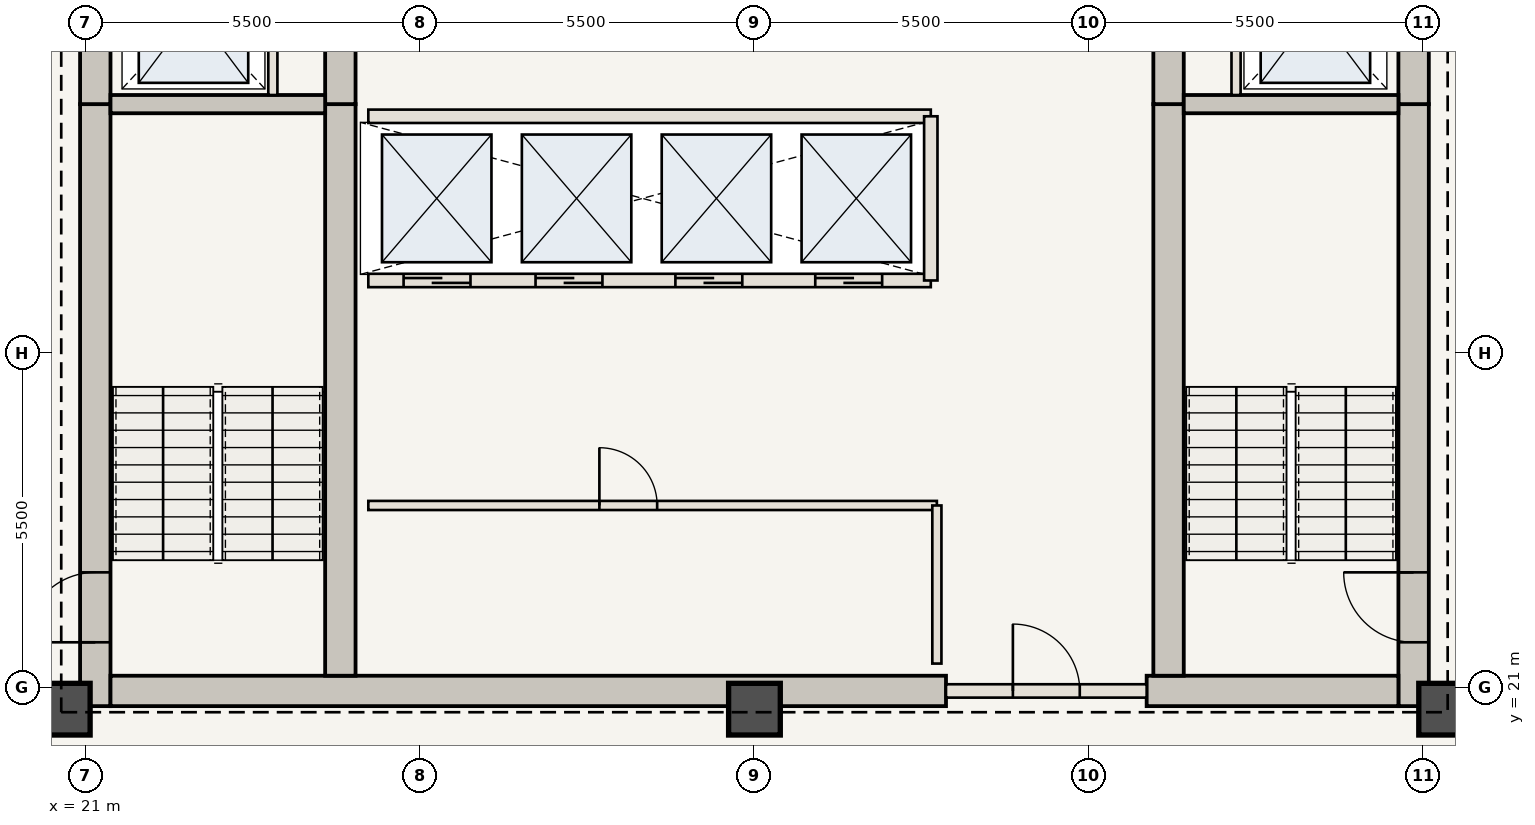
"""IFC4 building model, lengths in metres.
Left out: names, types, materials, properties, quantities, classifications, styles, units other than length and angle.
Written with IfcOpenShell. Run it as: python <this file> out.ifc"""

import sys

from ifc_helpers import new_model, si_unit, direction, frame, frame_2d, origin, origin_2d, place, context, subcontext, project, spatial, rectangle, extrude, element, fill, save


model = new_model("IFC4")
c1 = context("Model", 3, precision=1e-05, world=origin(), true_north=direction((0.0, 1.0)))
c2 = subcontext(c1, "Body", "Model", "MODEL_VIEW")
j1 = project(units=[si_unit("LENGTHUNIT", "METRE"), si_unit("PLANEANGLEUNIT", "RADIAN")], contexts=[c1])
p1 = place(None, origin())
s1 = spatial("IfcSite", under=j1, at=p1, CompositionType="ELEMENT")
p2 = place(p1, origin())
s2 = spatial("IfcBuilding", under=s1, at=p2, CompositionType="ELEMENT")
p3 = place(p2, frame((0.0, 0.0, 206.15)))
s3 = spatial("IfcBuildingStorey", under=s2, at=p3, CompositionType="ELEMENT", Elevation=206.15)
p4 = place(p3, frame((21.16, 20.7, 0.0), z_axis=(0.0, 0.0, 1.0), x_axis=(0.0, 1.0, 0.0)))
e1 = element("IfcWall", 1, at=p4, inside=s3, PredefinedType="SHEAR", context=c2, shape_type="SweptSolid", body=[
    extrude(rectangle(XDim=9.9, YDim=0.5, at=frame_2d((4.95, 0.0))), origin(), (0.0, 0.0, 1.0), 3.85),
])
p5 = place(p4, frame((1.05, 0.0, 0.0)))
e2 = element("IfcOpeningElement", 2, at=p5, cuts=e1, PredefinedType="OPENING", context=c2, shape_type="SweptSolid", body=[
    extrude(rectangle(XDim=1.15, YDim=2.15, at=frame_2d((0.575, 1.075))), frame((0.0, 0.26, 0.0), z_axis=(0.0, -1.0, 0.0), x_axis=(1.0, 0.0, 0.0)), (0.0, 0.0, 1.0), 0.52),
])
p6 = place(p3, frame((21.16, 30.6, 0.0), z_axis=(0.0, 0.0, 1.0), x_axis=(0.0, 1.0, 0.0)))
e3 = element("IfcWall", 3, at=p6, inside=s3, PredefinedType="SHEAR", context=c2, shape_type="SweptSolid", body=[
    extrude(rectangle(XDim=12.65, YDim=0.5, at=frame_2d((6.325, 0.0))), origin(), (0.0, 0.0, 1.0), 3.85),
])
p7 = place(p6, frame((4.2, 0.0, 0.0)))
e4 = element("IfcOpeningElement", 4, at=p7, cuts=e3, PredefinedType="OPENING", context=c2, shape_type="SweptSolid", body=[
    extrude(rectangle(XDim=1.1, YDim=2.15, at=frame_2d((0.55, 1.075))), frame((0.0, 0.26, 0.0), z_axis=(0.0, -1.0, 0.0), x_axis=(1.0, 0.0, 0.0)), (0.0, 0.0, 1.0), 0.52),
])
p8 = place(p6, frame((9.2, 0.0, 0.0)))
e5 = element("IfcOpeningElement", 5, at=p8, cuts=e3, PredefinedType="OPENING", context=c2, shape_type="SweptSolid", body=[
    extrude(rectangle(XDim=0.92, YDim=2.1, at=frame_2d((0.46, 1.05))), frame((0.0, 0.26, 0.0), z_axis=(0.0, -1.0, 0.0), x_axis=(1.0, 0.0, 0.0)), (0.0, 0.0, 1.0), 0.52),
])
p9 = place(p3, frame((42.84, 20.7, 0.0), z_axis=(0.0, 0.0, 1.0), x_axis=(0.0, 1.0, 0.0)))
e6 = element("IfcWall", 6, at=p9, inside=s3, PredefinedType="SHEAR", context=c2, shape_type="SweptSolid", body=[
    extrude(rectangle(XDim=9.9, YDim=0.5, at=frame_2d((4.95, 0.0))), origin(), (0.0, 0.0, 1.0), 3.85),
])
p10 = place(p9, frame((1.05, 0.0, 0.0)))
e7 = element("IfcOpeningElement", 7, at=p10, cuts=e6, PredefinedType="OPENING", context=c2, shape_type="SweptSolid", body=[
    extrude(rectangle(XDim=1.15, YDim=2.15, at=frame_2d((0.575, 1.075))), frame((0.0, 0.26, 0.0), z_axis=(0.0, -1.0, 0.0), x_axis=(1.0, 0.0, 0.0)), (0.0, 0.0, 1.0), 0.52),
])
p11 = place(p3, frame((42.84, 30.6, 0.0), z_axis=(0.0, 0.0, 1.0), x_axis=(0.0, 1.0, 0.0)))
e8 = element("IfcWall", 8, at=p11, inside=s3, PredefinedType="SHEAR", context=c2, shape_type="SweptSolid", body=[
    extrude(rectangle(XDim=12.65, YDim=0.5, at=frame_2d((6.325, 0.0))), origin(), (0.0, 0.0, 1.0), 3.85),
])
p12 = place(p11, frame((4.2, 0.0, 0.0)))
e9 = element("IfcOpeningElement", 9, at=p12, cuts=e8, PredefinedType="OPENING", context=c2, shape_type="SweptSolid", body=[
    extrude(rectangle(XDim=1.1, YDim=2.15, at=frame_2d((0.55, 1.075))), frame((0.0, 0.26, 0.0), z_axis=(0.0, -1.0, 0.0), x_axis=(1.0, 0.0, 0.0)), (0.0, 0.0, 1.0), 0.52),
])
p13 = place(p11, frame((8.05, 0.0, 0.0)))
e10 = element("IfcOpeningElement", 10, at=p13, cuts=e8, PredefinedType="OPENING", context=c2, shape_type="SweptSolid", body=[
    extrude(rectangle(XDim=0.88, YDim=2.1, at=frame_2d((0.44, 1.05))), frame((0.0, 0.26, 0.0), z_axis=(0.0, -1.0, 0.0), x_axis=(1.0, 0.0, 0.0)), (0.0, 0.0, 1.0), 0.52),
])
p14 = place(p11, frame((9.45, 0.0, 0.0)))
e11 = element("IfcOpeningElement", 11, at=p14, cuts=e8, PredefinedType="OPENING", context=c2, shape_type="SweptSolid", body=[
    extrude(rectangle(XDim=0.88, YDim=2.1, at=frame_2d((0.44, 1.05))), frame((0.0, 0.26, 0.0), z_axis=(0.0, -1.0, 0.0), x_axis=(1.0, 0.0, 0.0)), (0.0, 0.0, 1.0), 0.52),
])
p15 = place(p11, frame((10.85, 0.0, 0.0)))
e12 = element("IfcOpeningElement", 12, at=p15, cuts=e8, PredefinedType="OPENING", context=c2, shape_type="SweptSolid", body=[
    extrude(rectangle(XDim=0.88, YDim=2.1, at=frame_2d((0.44, 1.05))), frame((0.0, 0.26, 0.0), z_axis=(0.0, -1.0, 0.0), x_axis=(1.0, 0.0, 0.0)), (0.0, 0.0, 1.0), 0.52),
])
p16 = place(p3, frame((21.41, 20.95, 0.0), z_axis=(0.0, 0.0, 1.0), x_axis=(1.0, 0.0, 0.0)))
e13 = element("IfcWall", 13, at=p16, inside=s3, PredefinedType="SHEAR", context=c2, shape_type="SweptSolid", body=[
    extrude(rectangle(XDim=13.74, YDim=0.5, at=frame_2d((6.87, 0.0))), origin(), (0.0, 0.0, 1.0), 3.85),
])
p17 = place(p3, frame((38.45, 20.95, 0.0), z_axis=(0.0, 0.0, 1.0), x_axis=(1.0, 0.0, 0.0)))
e14 = element("IfcWall", 14, at=p17, inside=s3, PredefinedType="SHEAR", context=c2, shape_type="SweptSolid", body=[
    extrude(rectangle(XDim=4.14, YDim=0.5, at=frame_2d((2.07, 0.0))), origin(), (0.0, 0.0, 1.0), 3.85),
])
p18 = place(p3, frame((25.19, 21.2, 0.0), z_axis=(0.0, 0.0, 1.0), x_axis=(0.0, 1.0, 0.0)))
e15 = element("IfcWall", 15, at=p18, inside=s3, PredefinedType="SHEAR", context=c2, shape_type="SweptSolid", body=[
    extrude(rectangle(XDim=9.4, YDim=0.5, at=frame_2d((4.7, 0.0))), origin(), (0.0, 0.0, 1.0), 3.85),
])
p19 = place(p3, frame((25.19, 30.6, 0.0), z_axis=(0.0, 0.0, 1.0), x_axis=(0.0, 1.0, 0.0)))
e16 = element("IfcWall", 16, at=p19, inside=s3, PredefinedType="SHEAR", context=c2, shape_type="SweptSolid", body=[
    extrude(rectangle(XDim=12.15, YDim=0.5, at=frame_2d((6.075, 0.0))), origin(), (0.0, 0.0, 1.0), 3.85),
])
p20 = place(p19, frame((6.25, 0.0, 0.0)))
e17 = element("IfcOpeningElement", 17, at=p20, cuts=e16, PredefinedType="OPENING", context=c2, shape_type="SweptSolid", body=[
    extrude(rectangle(XDim=1.1, YDim=2.15, at=frame_2d((0.55, 1.075))), frame((0.0, 0.26, 0.0), z_axis=(0.0, -1.0, 0.0), x_axis=(1.0, 0.0, 0.0)), (0.0, 0.0, 1.0), 0.52),
])
p21 = place(p3, frame((38.81, 21.2, 0.0), z_axis=(0.0, 0.0, 1.0), x_axis=(0.0, 1.0, 0.0)))
e18 = element("IfcWall", 18, at=p21, inside=s3, PredefinedType="SHEAR", context=c2, shape_type="SweptSolid", body=[
    extrude(rectangle(XDim=9.4, YDim=0.5, at=frame_2d((4.7, 0.0))), origin(), (0.0, 0.0, 1.0), 3.85),
])
p22 = place(p3, frame((38.81, 30.6, 0.0), z_axis=(0.0, 0.0, 1.0), x_axis=(0.0, 1.0, 0.0)))
e19 = element("IfcWall", 19, at=p22, inside=s3, PredefinedType="SHEAR", context=c2, shape_type="SweptSolid", body=[
    extrude(rectangle(XDim=12.15, YDim=0.5, at=frame_2d((6.075, 0.0))), origin(), (0.0, 0.0, 1.0), 3.85),
])
for number, where, z_axis, x_axis in (
    (20, (20.65, 20.65, 0.0), (0.0, 0.0, 1.0), (1.0, 0.0, 0.0)),
    (21, (32.0, 20.65, 0.0), (0.0, 0.0, 1.0), (1.0, 0.0, 0.0)),
    (22, (43.35, 20.65, 0.0), (0.0, 0.0, 1.0), (1.0, 0.0, 0.0)),
):
    element("IfcColumn", number, at=place(p3, frame(where, z_axis=z_axis, x_axis=x_axis)), inside=s3, PredefinedType="COLUMN", context=c2, shape_type="SweptSolid", body=[
        extrude(rectangle(XDim=0.85, YDim=0.85, at=origin_2d()), origin(), (0.0, 0.0, 1.0), 3.85),
    ])
for number, where, z_axis, x_axis in (
    (23, (21.41, 30.6, 0.0), (0.0, 0.0, 1.0), (1.0, 0.0, 0.0)),
    (24, (39.06, 30.6, 0.0), (0.0, 0.0, 1.0), (1.0, 0.0, 0.0)),
):
    element("IfcWall", number, at=place(p3, frame(where, z_axis=z_axis, x_axis=x_axis)), inside=s3, PredefinedType="SHEAR", context=c2, shape_type="SweptSolid", body=[
        extrude(rectangle(XDim=3.53, YDim=0.3, at=frame_2d((1.765, 0.0))), origin(), (0.0, 0.0, 1.0), 3.685),
    ])
for number, where, z_axis, x_axis in (
    (25, (24.08, 30.75, 0.0), (0.0, 0.0, 1.0), (0.0, 1.0, 0.0)),
    (26, (39.92, 30.75, 0.0), (0.0, 0.0, 1.0), (0.0, 1.0, 0.0)),
):
    element("IfcWall", number, at=place(p3, frame(where, z_axis=z_axis, x_axis=x_axis)), inside=s3, PredefinedType="STANDARD", context=c2, shape_type="SweptSolid", body=[
        extrude(rectangle(XDim=2.65, YDim=0.15, at=frame_2d((1.325, 0.0))), origin(), (0.0, 0.0, 1.0), 3.685),
    ])
p23 = place(p3, frame((35.15, 20.95, 0.0), z_axis=(0.0, 0.0, 1.0), x_axis=(1.0, 0.0, 0.0)))
e27 = element("IfcWall", 27, at=p23, inside=s3, PredefinedType="STANDARD", context=c2, shape_type="SweptSolid", body=[
    extrude(rectangle(XDim=3.3, YDim=0.22, at=frame_2d((1.65, 0.0))), origin(), (0.0, 0.0, 1.0), 3.685),
])
p24 = place(p23, frame((1.1, 0.0, 0.0)))
e28 = element("IfcOpeningElement", 28, at=p24, cuts=e27, PredefinedType="OPENING", context=c2, shape_type="SweptSolid", body=[
    extrude(rectangle(XDim=1.1, YDim=2.15, at=frame_2d((0.55, 1.075))), frame((0.0, 0.12, 0.0), z_axis=(0.0, -1.0, 0.0), x_axis=(1.0, 0.0, 0.0)), (0.0, 0.0, 1.0), 0.24),
])
p25 = place(p3, frame((25.65, 24.0, 0.0), z_axis=(0.0, 0.0, 1.0), x_axis=(1.0, 0.0, 0.0)))
e29 = element("IfcWall", 29, at=p25, inside=s3, PredefinedType="STANDARD", context=c2, shape_type="SweptSolid", body=[
    extrude(rectangle(XDim=9.35, YDim=0.15, at=frame_2d((4.675, 0.0))), origin(), (0.0, 0.0, 1.0), 3.685),
])
p26 = place(p25, frame((3.8, 0.0, 0.0)))
e30 = element("IfcOpeningElement", 30, at=p26, cuts=e29, PredefinedType="OPENING", context=c2, shape_type="SweptSolid", body=[
    extrude(rectangle(XDim=0.95, YDim=2.15, at=frame_2d((0.475, 1.075))), frame((0.0, 0.085, 0.0), z_axis=(0.0, -1.0, 0.0), x_axis=(1.0, 0.0, 0.0)), (0.0, 0.0, 1.0), 0.17),
])
p27 = place(p3, frame((35.0, 21.4, 0.0), z_axis=(0.0, 0.0, 1.0), x_axis=(0.0, 1.0, 0.0)))
e31 = element("IfcWall", 31, at=p27, inside=s3, PredefinedType="STANDARD", context=c2, shape_type="SweptSolid", body=[
    extrude(rectangle(XDim=2.6, YDim=0.15, at=frame_2d((1.3, 0.0))), origin(), (0.0, 0.0, 1.0), 3.685),
])
p28 = place(p3, frame((25.65, 27.7, 0.0), z_axis=(0.0, 0.0, 1.0), x_axis=(1.0, 0.0, 0.0)))
e32 = element("IfcWall", 32, at=p28, inside=s3, PredefinedType="STANDARD", context=c2, shape_type="SweptSolid", body=[
    extrude(rectangle(XDim=9.25, YDim=0.22, at=frame_2d((4.625, 0.0))), origin(), (0.0, 0.0, 1.0), 3.685),
])
p29 = place(p28, frame((0.58, 0.0, 0.0)))
e33 = element("IfcOpeningElement", 33, at=p29, cuts=e32, PredefinedType="OPENING", context=c2, shape_type="SweptSolid", body=[
    extrude(rectangle(XDim=1.1, YDim=2.15, at=frame_2d((0.55, 1.075))), frame((0.0, 0.12, 0.0), z_axis=(0.0, -1.0, 0.0), x_axis=(1.0, 0.0, 0.0)), (0.0, 0.0, 1.0), 0.24),
])
p30 = place(p28, frame((2.75, 0.0, 0.0)))
e34 = element("IfcOpeningElement", 34, at=p30, cuts=e32, PredefinedType="OPENING", context=c2, shape_type="SweptSolid", body=[
    extrude(rectangle(XDim=1.1, YDim=2.15, at=frame_2d((0.55, 1.075))), frame((0.0, 0.12, 0.0), z_axis=(0.0, -1.0, 0.0), x_axis=(1.0, 0.0, 0.0)), (0.0, 0.0, 1.0), 0.24),
])
p31 = place(p28, frame((5.05, 0.0, 0.0)))
e35 = element("IfcOpeningElement", 35, at=p31, cuts=e32, PredefinedType="OPENING", context=c2, shape_type="SweptSolid", body=[
    extrude(rectangle(XDim=1.1, YDim=2.15, at=frame_2d((0.55, 1.075))), frame((0.0, 0.12, 0.0), z_axis=(0.0, -1.0, 0.0), x_axis=(1.0, 0.0, 0.0)), (0.0, 0.0, 1.0), 0.24),
])
p32 = place(p28, frame((7.35, 0.0, 0.0)))
e36 = element("IfcOpeningElement", 36, at=p32, cuts=e32, PredefinedType="OPENING", context=c2, shape_type="SweptSolid", body=[
    extrude(rectangle(XDim=1.1, YDim=2.15, at=frame_2d((0.55, 1.075))), frame((0.0, 0.12, 0.0), z_axis=(0.0, -1.0, 0.0), x_axis=(1.0, 0.0, 0.0)), (0.0, 0.0, 1.0), 0.24),
])
p33 = place(p3, frame((25.65, 30.4, 0.0), z_axis=(0.0, 0.0, 1.0), x_axis=(1.0, 0.0, 0.0)))
e37 = element("IfcWall", 37, at=p33, inside=s3, PredefinedType="STANDARD", context=c2, shape_type="SweptSolid", body=[
    extrude(rectangle(XDim=9.25, YDim=0.22, at=frame_2d((4.625, 0.0))), origin(), (0.0, 0.0, 1.0), 3.685),
])
p34 = place(p3, frame((34.9, 27.7, 0.0), z_axis=(0.0, 0.0, 1.0), x_axis=(0.0, 1.0, 0.0)))
e38 = element("IfcWall", 38, at=p34, inside=s3, PredefinedType="STANDARD", context=c2, shape_type="SweptSolid", body=[
    extrude(rectangle(XDim=2.7, YDim=0.22, at=frame_2d((1.35, 0.0))), origin(), (0.0, 0.0, 1.0), 3.685),
])
p35 = place(p5, origin())
e39 = element("IfcDoor", 39, at=p35, inside=s3, OperationType="SINGLE_SWING_LEFT", PredefinedType="DOOR", context=c2, shape_type="SweptSolid", body=[
    extrude(rectangle(XDim=1.15, YDim=2.15, at=frame_2d((0.575, 1.075))), frame((0.0, 0.025, 0.0), z_axis=(0.0, -1.0, 0.0), x_axis=(1.0, 0.0, 0.0)), (0.0, 0.0, 1.0), 0.05),
])
fill(e2, e39)
p36 = place(p10, origin())
e40 = element("IfcDoor", 40, at=p36, inside=s3, OperationType="SINGLE_SWING_RIGHT", PredefinedType="DOOR", context=c2, shape_type="SweptSolid", body=[
    extrude(rectangle(XDim=1.15, YDim=2.15, at=frame_2d((0.575, 1.075))), frame((0.0, 0.025, 0.0), z_axis=(0.0, -1.0, 0.0), x_axis=(1.0, 0.0, 0.0)), (0.0, 0.0, 1.0), 0.05),
])
fill(e7, e40)
p37 = place(p24, origin())
e41 = element("IfcDoor", 41, at=p37, inside=s3, OperationType="SINGLE_SWING_LEFT", PredefinedType="DOOR", context=c2, shape_type="SweptSolid", body=[
    extrude(rectangle(XDim=1.1, YDim=2.15, at=frame_2d((0.55, 1.075))), frame((0.0, 0.025, 0.0), z_axis=(0.0, -1.0, 0.0), x_axis=(1.0, 0.0, 0.0)), (0.0, 0.0, 1.0), 0.05),
])
fill(e28, e41)
p38 = place(p26, origin())
e42 = element("IfcDoor", 42, at=p38, inside=s3, OperationType="SINGLE_SWING_LEFT", PredefinedType="DOOR", context=c2, shape_type="SweptSolid", body=[
    extrude(rectangle(XDim=0.95, YDim=2.15, at=frame_2d((0.475, 1.075))), frame((0.0, 0.025, 0.0), z_axis=(0.0, -1.0, 0.0), x_axis=(1.0, 0.0, 0.0)), (0.0, 0.0, 1.0), 0.05),
])
fill(e30, e42)
p39 = place(p29, origin())
e43 = element("IfcDoor", 43, at=p39, inside=s3, OperationType="DOUBLE_DOOR_SLIDING", PredefinedType="DOOR", context=c2, shape_type="SweptSolid", body=[
    extrude(rectangle(XDim=1.1, YDim=2.15, at=frame_2d((0.55, 1.075))), frame((0.0, 0.025, 0.0), z_axis=(0.0, -1.0, 0.0), x_axis=(1.0, 0.0, 0.0)), (0.0, 0.0, 1.0), 0.05),
])
fill(e33, e43)
p40 = place(p30, origin())
e44 = element("IfcDoor", 44, at=p40, inside=s3, OperationType="DOUBLE_DOOR_SLIDING", PredefinedType="DOOR", context=c2, shape_type="SweptSolid", body=[
    extrude(rectangle(XDim=1.1, YDim=2.15, at=frame_2d((0.55, 1.075))), frame((0.0, 0.025, 0.0), z_axis=(0.0, -1.0, 0.0), x_axis=(1.0, 0.0, 0.0)), (0.0, 0.0, 1.0), 0.05),
])
fill(e34, e44)
p41 = place(p31, origin())
e45 = element("IfcDoor", 45, at=p41, inside=s3, OperationType="DOUBLE_DOOR_SLIDING", PredefinedType="DOOR", context=c2, shape_type="SweptSolid", body=[
    extrude(rectangle(XDim=1.1, YDim=2.15, at=frame_2d((0.55, 1.075))), frame((0.0, 0.025, 0.0), z_axis=(0.0, -1.0, 0.0), x_axis=(1.0, 0.0, 0.0)), (0.0, 0.0, 1.0), 0.05),
])
fill(e35, e45)
p42 = place(p32, origin())
e46 = element("IfcDoor", 46, at=p42, inside=s3, OperationType="DOUBLE_DOOR_SLIDING", PredefinedType="DOOR", context=c2, shape_type="SweptSolid", body=[
    extrude(rectangle(XDim=1.1, YDim=2.15, at=frame_2d((0.55, 1.075))), frame((0.0, 0.025, 0.0), z_axis=(0.0, -1.0, 0.0), x_axis=(1.0, 0.0, 0.0)), (0.0, 0.0, 1.0), 0.05),
])
fill(e36, e46)
save(model, sys.argv[1])
